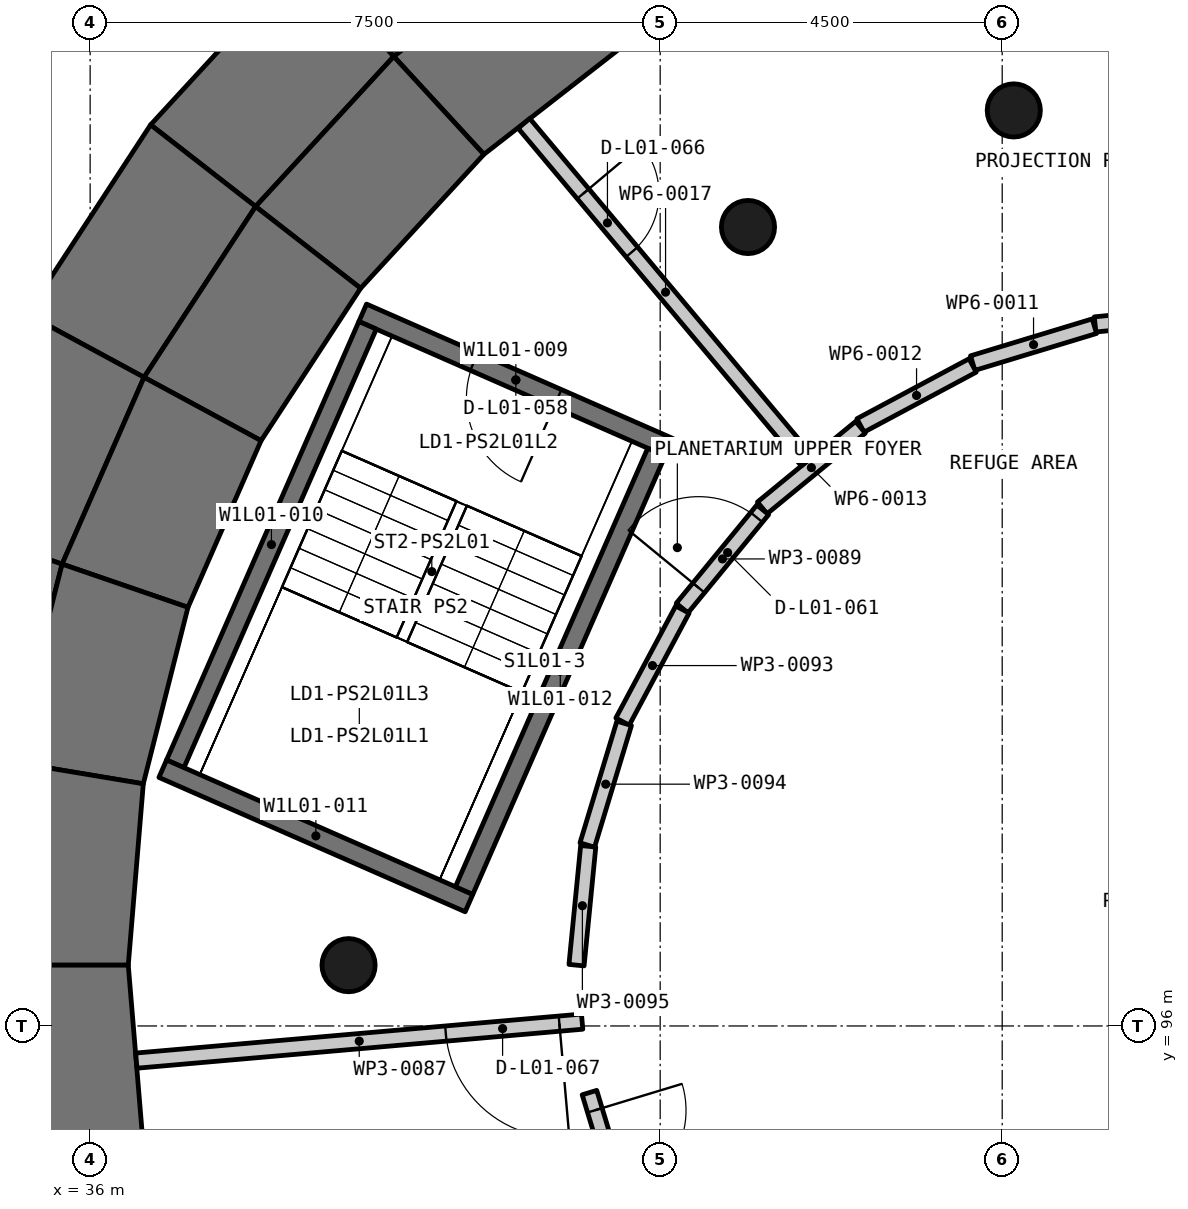
"""IFC4 building model, lengths in metres.
Left out: names, types, materials, properties, quantities, classifications, styles, units other than length and angle.
Written with IfcOpenShell. Run it as: python <this file> out.ifc"""

import sys

from ifc_helpers import new_model, si_unit, direction, frame, frame_2d, origin, origin_2d, place, context, subcontext, project, spatial, polyline, rectangle, circle, outline, extrude, element, fill, save


model = new_model("IFC4")
c1 = context("Model", 3, precision=1e-05, world=origin(), true_north=direction((0.0, 1.0)))
c2 = subcontext(c1, "Body", "Model", "MODEL_VIEW")
j1 = project(units=[si_unit("LENGTHUNIT", "METRE"), si_unit("PLANEANGLEUNIT", "RADIAN")], contexts=[c1])
p1 = place(None, origin())
s1 = spatial("IfcSite", under=j1, at=p1, CompositionType="ELEMENT")
p2 = place(p1, origin())
s2 = spatial("IfcBuilding", under=s1, at=p2, CompositionType="ELEMENT")
p3 = place(p2, frame((0.0, 0.0, 6.0)))
s3 = spatial("IfcBuildingStorey", under=s2, at=p3, CompositionType="ELEMENT", Elevation=6.0)
for number, where, z_axis, x_axis in (
    (1, (48.152, 108.045, -0.3), (0.0, 0.0, 1.0), (1.0, 0.0, 0.0)),
    (2, (44.656, 106.511, -0.3), (0.0, 0.0, 1.0), (1.0, 0.0, 0.0)),
    (3, (39.4, 96.8, -0.3), (0.0, 0.0, 1.0), (1.0, 0.0, 0.0)),
):
    element("IfcColumn", number, at=place(p3, frame(where, z_axis=z_axis, x_axis=x_axis)), inside=s3, PredefinedType="COLUMN", context=c2, shape_type="SweptSolid", body=[
        extrude(circle(Radius=0.35, at=origin_2d()), origin(), (0.0, 0.0, 1.0), 5.25),
    ])
p4 = place(p3, frame((41.691, 111.18, -0.3), z_axis=(0.0, 0.0, 1.0), x_axis=(-0.78913990845, -0.614213484785, 0.0)))
e4 = element("IfcWall", 4, at=p4, inside=s3, PredefinedType="SHEAR", context=c2, shape_type="SweptSolid", body=[
    extrude(outline(polyline([(0.0, -0.873), (2.973, -0.873), (2.828, 0.873), (0.144, 0.872), (0.0, -0.873)])), origin(), (0.0, 0.0, 1.0), 2.625),
])
p5 = place(p3, frame((39.451, 109.452, -0.3), z_axis=(0.0, 0.0, 1.0), x_axis=(-0.677266435816, -0.73573784388, 0.0)))
e5 = element("IfcWall", 5, at=p5, inside=s3, PredefinedType="SHEAR", context=c2, shape_type="SweptSolid", body=[
    extrude(outline(polyline([(0.0, -0.872), (2.973, -0.872), (2.828, 0.872), (0.145, 0.873), (0.0, -0.872)])), origin(), (0.0, 0.0, 1.0), 2.625),
])
p6 = place(p3, frame((37.526, 107.379, -0.3), z_axis=(0.0, 0.0, 1.0), x_axis=(-0.546943979507, -0.837169208273, 0.0)))
e6 = element("IfcWall", 6, at=p6, inside=s3, PredefinedType="SHEAR", context=c2, shape_type="SweptSolid", body=[
    extrude(outline(polyline([(0.0, -0.873), (2.973, -0.873), (2.828, 0.872), (0.145, 0.872), (0.0, -0.873)])), origin(), (0.0, 0.0, 1.0), 2.625),
])
p7 = place(p3, frame((35.969, 105.017, -0.3), z_axis=(0.0, 0.0, 1.0), x_axis=(-0.401744866956, -0.915751637659, 0.0)))
e7 = element("IfcWall", 7, at=p7, inside=s3, PredefinedType="SHEAR", context=c2, shape_type="SweptSolid", body=[
    extrude(outline(polyline([(0.0, -0.873), (2.973, -0.872), (2.828, 0.873), (0.145, 0.872), (0.0, -0.873)])), origin(), (0.0, 0.0, 1.0), 2.625),
])
p8 = place(p3, frame((34.821, 102.43, -0.3), z_axis=(0.0, 0.0, 1.0), x_axis=(-0.245471690726, -0.969403759562, 0.0)))
e8 = element("IfcWall", 8, at=p8, inside=s3, PredefinedType="SHEAR", context=c2, shape_type="SweptSolid", body=[
    extrude(outline(polyline([(0.0, -0.872), (2.973, -0.872), (2.828, 0.872), (0.145, 0.873), (0.0, -0.872)])), origin(), (0.0, 0.0, 1.0), 2.625),
])
p9 = place(p3, frame((42.648, 109.715, -0.3), z_axis=(0.0, 0.0, 1.0), x_axis=(-0.789141546579, -0.614211380115, 0.0)))
e9 = element("IfcWall", 9, at=p9, inside=s3, PredefinedType="SHEAR", context=c2, shape_type="SweptSolid", body=[
    extrude(outline(polyline([(0.0, -0.873), (2.684, -0.872), (2.539, 0.873), (0.145, 0.873), (0.0, -0.873)])), origin(), (0.0, 0.0, 1.0), 2.625),
])
p10 = place(p3, frame((40.637, 108.164, -0.3), z_axis=(0.0, 0.0, 1.0), x_axis=(-0.677255547469, -0.735747866747, 0.0)))
e10 = element("IfcWall", 10, at=p10, inside=s3, PredefinedType="SHEAR", context=c2, shape_type="SweptSolid", body=[
    extrude(outline(polyline([(0.0, -0.872), (2.684, -0.873), (2.539, 0.872), (0.145, 0.872), (0.0, -0.872)])), origin(), (0.0, 0.0, 1.0), 2.625),
])
p11 = place(p3, frame((38.907, 106.303, -0.3), z_axis=(0.0, 0.0, 1.0), x_axis=(-0.546950284291, -0.837165089163, 0.0)))
e11 = element("IfcWall", 11, at=p11, inside=s3, PredefinedType="SHEAR", context=c2, shape_type="SweptSolid", body=[
    extrude(outline(polyline([(0.0, -0.873), (2.684, -0.873), (2.539, 0.872), (0.145, 0.873), (0.0, -0.873)])), origin(), (0.0, 0.0, 1.0), 2.625),
])
p12 = place(p3, frame((37.508, 104.183, -0.3), z_axis=(0.0, 0.0, 1.0), x_axis=(-0.401711016893, -0.915766487106, 0.0)))
e12 = element("IfcWall", 12, at=p12, inside=s3, PredefinedType="SHEAR", context=c2, shape_type="SweptSolid", body=[
    extrude(outline(polyline([(0.0, -0.873), (2.684, -0.872), (2.539, 0.873), (0.145, 0.872), (0.0, -0.873)])), origin(), (0.0, 0.0, 1.0), 2.625),
])
p13 = place(p3, frame((36.477, 101.862, -0.3), z_axis=(0.0, 0.0, 1.0), x_axis=(-0.245531165049, -0.969388697577, 0.0)))
e13 = element("IfcWall", 13, at=p13, inside=s3, PredefinedType="SHEAR", context=c2, shape_type="SweptSolid", body=[
    extrude(outline(polyline([(-0.0, -0.873), (2.684, -0.873), (2.539, 0.873), (0.145, 0.873), (-0.0, -0.873)])), origin(), (0.0, 0.0, 1.0), 2.625),
])
p14 = place(p3, frame((35.842, 99.403, -0.3), z_axis=(0.0, 0.0, 1.0), x_axis=(-0.082601284234, -0.996582674866, 0.0)))
e14 = element("IfcWall", 14, at=p14, inside=s3, PredefinedType="SHEAR", context=c2, shape_type="SweptSolid", body=[
    extrude(outline(polyline([(0.0, -0.873), (2.684, -0.872), (2.539, 0.872), (0.145, 0.872), (0.0, -0.873)])), origin(), (0.0, 0.0, 1.0), 2.625),
])
p15 = place(p3, frame((35.62, 96.872, -0.3), z_axis=(0.0, 0.0, 1.0), x_axis=(0.082601284234, -0.996582674866, 0.0)))
e15 = element("IfcWall", 15, at=p15, inside=s3, PredefinedType="SHEAR", context=c2, shape_type="SweptSolid", body=[
    extrude(outline(polyline([(0.0, -0.872), (2.684, -0.873), (2.539, 0.872), (0.145, 0.872), (0.0, -0.872)])), origin(), (0.0, 0.0, 1.0), 2.625),
])
p16 = place(p3, frame((42.371, 110.226, 2.325), z_axis=(0.0, 0.0, 1.0), x_axis=(-0.789178347827, -0.614164094783, 0.0)))
e16 = element("IfcWall", 16, at=p16, inside=s3, PredefinedType="SHEAR", context=c2, shape_type="SweptSolid", body=[
    extrude(outline(polyline([(0.0, -1.446), (2.874, -1.446), (2.634, 1.446), (0.239, 1.446), (0.0, -1.446)])), origin(), (0.0, 0.0, 1.0), 2.625),
])
p17 = place(p3, frame((40.279, 108.622, 2.325), z_axis=(0.0, 0.0, 1.0), x_axis=(-0.677277359134, -0.735727788523, 0.0)))
e17 = element("IfcWall", 17, at=p17, inside=s3, PredefinedType="SHEAR", context=c2, shape_type="SweptSolid", body=[
    extrude(outline(polyline([(0.0, -1.446), (2.874, -1.446), (2.634, 1.446), (0.24, 1.446), (0.0, -1.446)])), origin(), (0.0, 0.0, 1.0), 2.625),
])
p18 = place(p3, frame((38.479, 106.697, 2.325), z_axis=(0.0, 0.0, 1.0), x_axis=(-0.546951759565, -0.837164125311, 0.0)))
e18 = element("IfcWall", 18, at=p18, inside=s3, PredefinedType="SHEAR", context=c2, shape_type="SweptSolid", body=[
    extrude(outline(polyline([(0.0, -1.446), (2.874, -1.446), (2.634, 1.446), (0.24, 1.446), (0.0, -1.446)])), origin(), (0.0, 0.0, 1.0), 2.625),
])
p19 = place(p3, frame((37.021, 104.501, 2.325), z_axis=(0.0, 0.0, 1.0), x_axis=(-0.40165649528, -0.915790401675, 0.0)))
e19 = element("IfcWall", 19, at=p19, inside=s3, PredefinedType="SHEAR", context=c2, shape_type="SweptSolid", body=[
    extrude(outline(polyline([(0.0, -1.446), (2.874, -1.446), (2.634, 1.446), (0.24, 1.446), (0.0, -1.446)])), origin(), (0.0, 0.0, 1.0), 2.625),
])
p20 = place(p3, frame((35.944, 102.095, 2.325), z_axis=(0.0, 0.0, 1.0), x_axis=(-0.245453198001, -0.969408442088, 0.0)))
e20 = element("IfcWall", 20, at=p20, inside=s3, PredefinedType="SHEAR", context=c2, shape_type="SweptSolid", body=[
    extrude(outline(polyline([(0.0, -1.446), (2.874, -1.446), (2.634, 1.446), (0.24, 1.446), (0.0, -1.446)])), origin(), (0.0, 0.0, 1.0), 2.625),
])
p21 = place(p3, frame((35.278, 99.544, 2.325), z_axis=(0.0, 0.0, 1.0), x_axis=(-0.08258141183, -0.996584321781, 0.0)))
e21 = element("IfcWall", 21, at=p21, inside=s3, PredefinedType="SHEAR", context=c2, shape_type="SweptSolid", body=[
    extrude(outline(polyline([(0.0, -1.446), (2.874, -1.446), (2.634, 1.446), (0.24, 1.446), (0.0, -1.446)])), origin(), (0.0, 0.0, 1.0), 2.625),
])
p22 = place(p3, frame((35.041, 96.919, 2.325), z_axis=(0.0, 0.0, 1.0), x_axis=(0.082574420244, -0.99658490111, 0.0)))
e22 = element("IfcWall", 22, at=p22, inside=s3, PredefinedType="SHEAR", context=c2, shape_type="SweptSolid", body=[
    extrude(outline(polyline([(0.0, -1.446), (2.874, -1.446), (2.634, 1.446), (0.24, 1.446), (0.0, -1.446)])), origin(), (0.0, 0.0, 1.0), 2.625),
])
p23 = place(p3, frame((43.616, 103.615, -0.3), z_axis=(0.0, 0.0, 1.0), x_axis=(-0.915768514631, 0.401706394785, 0.0)))
e23 = element("IfcWall", 23, at=p23, inside=s3, PredefinedType="SHEAR", context=c2, shape_type="SweptSolid", body=[
    extrude(rectangle(XDim=4.4, YDim=0.25, at=frame_2d((2.2, 0.0))), origin(), (0.0, 0.0, 1.0), 5.25),
])
p24 = place(p23, frame((1.6, 0.0, 0.3)))
e24 = element("IfcOpeningElement", 24, at=p24, cuts=e23, PredefinedType="OPENING", context=c2, shape_type="SweptSolid", body=[
    extrude(rectangle(XDim=1.2, YDim=2.2, at=frame_2d((0.6, 1.1))), frame((0.0, 0.135, 0.0), z_axis=(0.0, -1.0, 0.0), x_axis=(1.0, 0.0, 0.0)), (0.0, 0.0, 1.0), 0.27),
])
p25 = place(p3, frame((39.651, 105.218, -0.3), z_axis=(0.0, 0.0, 1.0), x_axis=(-0.401711100828, -0.915766450287, 0.0)))
e25 = element("IfcWall", 25, at=p25, inside=s3, PredefinedType="SHEAR", context=c2, shape_type="SweptSolid", body=[
    extrude(rectangle(XDim=6.3, YDim=0.25, at=frame_2d((3.15, 0.0))), origin(), (0.0, 0.0, 1.0), 5.25),
])
p26 = place(p3, frame((40.985, 97.617, -0.3), z_axis=(0.0, 0.0, 1.0), x_axis=(-0.915768514631, 0.401706394785, 0.0)))
e26 = element("IfcWall", 26, at=p26, inside=s3, PredefinedType="SHEAR", context=c2, shape_type="SweptSolid", body=[
    extrude(rectangle(XDim=4.4, YDim=0.25, at=frame_2d((2.2, 0.0))), origin(), (0.0, 0.0, 1.0), 5.25),
])
p27 = place(p3, frame((43.451, 103.551, -0.3), z_axis=(0.0, 0.0, 1.0), x_axis=(-0.401678600913, -0.915780706047, 0.0)))
e27 = element("IfcWall", 27, at=p27, inside=s3, PredefinedType="SHEAR", context=c2, shape_type="SweptSolid", body=[
    extrude(rectangle(XDim=6.3, YDim=0.25, at=frame_2d((3.15, 0.0))), origin(), (0.0, 0.0, 1.0), 5.25),
])
p28 = place(p3, frame((42.473, 96.057, 0.0), z_axis=(0.0, 0.0, 1.0), x_axis=(-0.99619799204, -0.087118084548, 0.0)))
e28 = element("IfcWall", 28, at=p28, inside=s3, PredefinedType="PARTITIONING", context=c2, shape_type="SweptSolid", body=[
    extrude(rectangle(XDim=5.888, YDim=0.2, at=frame_2d((2.944, 0.0))), origin(), (0.0, 0.0, 1.0), 4.15),
])
p29 = place(p28, frame((0.301, 0.0, 0.0)))
e29 = element("IfcOpeningElement", 29, at=p29, cuts=e28, PredefinedType="OPENING", context=c2, shape_type="SweptSolid", body=[
    extrude(rectangle(XDim=1.5, YDim=2.1, at=frame_2d((0.75, 1.05))), frame((0.0, 0.11, 0.0), z_axis=(0.0, -1.0, 0.0), x_axis=(1.0, 0.0, 0.0)), (0.0, 0.0, 1.0), 0.22),
])
p30 = place(p3, frame((49.222, 105.229, 0.0), z_axis=(0.0, 0.0, 1.0), x_axis=(0.995187275823, 0.097991254916, 0.0)))
e30 = element("IfcWall", 30, at=p30, inside=s3, PredefinedType="PARTITIONING", context=c2, shape_type="SweptSolid", body=[
    extrude(rectangle(XDim=1.886, YDim=0.2, at=frame_2d((0.943, 0.0))), origin(), (0.0, 0.0, 1.0), 4.95),
])
for number, where, z_axis, x_axis in (
    (31, (47.612, 104.721, 0.0), (0.0, 0.0, 1.0), (0.957, 0.29, 0.0)),
    (32, (46.135, 103.901, 0.0), (0.0, 0.0, 1.0), (0.882, 0.471, 0.0)),
):
    element("IfcWall", number, at=place(p3, frame(where, z_axis=z_axis, x_axis=x_axis)), inside=s3, PredefinedType="PARTITIONING", context=c2, shape_type="SweptSolid", body=[
        extrude(rectangle(XDim=1.673, YDim=0.2, at=frame_2d((0.836, 0.0))), origin(), (0.0, 0.0, 1.0), 4.95),
    ])
p31 = place(p3, frame((44.843, 102.816, 0.0), z_axis=(0.0, 0.0, 1.0), x_axis=(0.772941126344, 0.634477749969, 0.0)))
e33 = element("IfcWall", 33, at=p31, inside=s3, PredefinedType="PARTITIONING", context=c2, shape_type="SweptSolid", body=[
    extrude(rectangle(XDim=1.672, YDim=0.2, at=frame_2d((0.836, 0.0))), origin(), (0.0, 0.0, 1.0), 4.95),
])
p32 = place(p3, frame((43.789, 101.498, 0.0), z_axis=(0.0, 0.0, 1.0), x_axis=(0.634421768811, 0.772987075739, 0.0)))
e34 = element("IfcWall", 34, at=p32, inside=s3, PredefinedType="PARTITIONING", context=c2, shape_type="SweptSolid", body=[
    extrude(rectangle(XDim=1.672, YDim=0.2, at=frame_2d((0.836, 0.0))), origin(), (0.0, 0.0, 1.0), 4.95),
])
p33 = place(p32, frame((0.344, 0.0, 0.0)))
e35 = element("IfcOpeningElement", 35, at=p33, cuts=e34, PredefinedType="OPENING", context=c2, shape_type="SweptSolid", body=[
    extrude(rectangle(XDim=1.2, YDim=2.1, at=frame_2d((0.6, 1.05))), frame((0.0, 0.11, 0.0), z_axis=(0.0, -1.0, 0.0), x_axis=(1.0, 0.0, 0.0)), (0.0, 0.0, 1.0), 0.22),
])
p34 = place(p3, frame((43.005, 100.004, 0.0), z_axis=(0.0, 0.0, 1.0), x_axis=(0.471467367282, 0.881883507946, 0.0)))
e36 = element("IfcWall", 36, at=p34, inside=s3, PredefinedType="PARTITIONING", context=c2, shape_type="SweptSolid", body=[
    extrude(rectangle(XDim=1.672, YDim=0.2, at=frame_2d((0.836, 0.0))), origin(), (0.0, 0.0, 1.0), 4.95),
])
p35 = place(p3, frame((42.541, 98.381, 0.0), z_axis=(0.0, 0.0, 1.0), x_axis=(0.2902382352, 0.956954422545, 0.0)))
e37 = element("IfcWall", 37, at=p35, inside=s3, PredefinedType="PARTITIONING", context=c2, shape_type="SweptSolid", body=[
    extrude(rectangle(XDim=1.673, YDim=0.2, at=frame_2d((0.836, 0.0))), origin(), (0.0, 0.0, 1.0), 4.95),
])
p36 = place(p3, frame((42.399, 96.8, 0.0), z_axis=(0.0, 0.0, 1.0), x_axis=(0.098026998104, 0.995183755717, 0.0)))
e38 = element("IfcWall", 38, at=p36, inside=s3, PredefinedType="PARTITIONING", context=c2, shape_type="SweptSolid", body=[
    extrude(rectangle(XDim=1.572, YDim=0.2, at=frame_2d((0.786, 0.0))), origin(), (0.0, 0.0, 1.0), 4.95),
])
p37 = place(p3, frame((42.57, 95.124, 0.0), z_axis=(0.0, 0.0, 1.0), x_axis=(0.290356433396, -0.956918565807, 0.0)))
e39 = element("IfcWall", 39, at=p37, inside=s3, PredefinedType="PARTITIONING", context=c2, shape_type="SweptSolid", body=[
    extrude(rectangle(XDim=1.786, YDim=0.2, at=frame_2d((0.893, 0.0))), origin(), (0.0, 0.0, 1.0), 4.95),
])
p38 = place(p37, frame((0.244, 0.0, 0.0)))
e40 = element("IfcOpeningElement", 40, at=p38, cuts=e39, PredefinedType="OPENING", context=c2, shape_type="SweptSolid", body=[
    extrude(rectangle(XDim=1.2, YDim=2.1, at=frame_2d((0.6, 1.05))), frame((0.0, 0.11, 0.0), z_axis=(0.0, -1.0, 0.0), x_axis=(1.0, 0.0, 0.0)), (0.0, 0.0, 1.0), 0.22),
])
p39 = place(p3, frame((41.708, 107.875, 0.0), z_axis=(0.0, 0.0, 1.0), x_axis=(0.642761379623, -0.76606645199, 0.0)))
e41 = element("IfcWall", 41, at=p39, inside=s3, PredefinedType="PARTITIONING", context=c2, shape_type="SweptSolid", body=[
    extrude(rectangle(XDim=5.797, YDim=0.2, at=frame_2d((2.899, 0.0))), origin(), (0.0, 0.0, 1.0), 4.15),
])
p40 = place(p39, frame((1.209, 0.0, 0.0)))
e42 = element("IfcOpeningElement", 42, at=p40, cuts=e41, PredefinedType="OPENING", context=c2, shape_type="SweptSolid", body=[
    extrude(rectangle(XDim=1.0, YDim=2.1, at=frame_2d((0.5, 1.05))), frame((0.0, 0.11, 0.0), z_axis=(0.0, -1.0, 0.0), x_axis=(1.0, 0.0, 0.0)), (0.0, 0.0, 1.0), 0.22),
])
p41 = place(p24, origin())
e43 = element("IfcDoor", 43, at=p41, inside=s3, OperationType="SINGLE_SWING_LEFT", PredefinedType="DOOR", context=c2, shape_type="SweptSolid", body=[
    extrude(rectangle(XDim=1.2, YDim=2.2, at=frame_2d((0.6, 1.1))), frame((0.0, 0.025, 0.0), z_axis=(0.0, -1.0, 0.0), x_axis=(1.0, 0.0, 0.0)), (0.0, 0.0, 1.0), 0.05),
])
fill(e24, e43)
p42 = place(p38, origin())
e44 = element("IfcDoor", 44, at=p42, inside=s3, OperationType="SINGLE_SWING_RIGHT", PredefinedType="DOOR", context=c2, shape_type="SweptSolid", body=[
    extrude(rectangle(XDim=1.2, YDim=2.1, at=frame_2d((0.6, 1.05))), frame((0.0, 0.025, 0.0), z_axis=(0.0, -1.0, 0.0), x_axis=(1.0, 0.0, 0.0)), (0.0, 0.0, 1.0), 0.05),
])
fill(e40, e44)
p43 = place(p33, origin())
e45 = element("IfcDoor", 45, at=p43, inside=s3, OperationType="SINGLE_SWING_LEFT", PredefinedType="DOOR", context=c2, shape_type="SweptSolid", body=[
    extrude(rectangle(XDim=1.2, YDim=2.1, at=frame_2d((0.6, 1.05))), frame((0.0, 0.025, 0.0), z_axis=(0.0, -1.0, 0.0), x_axis=(1.0, 0.0, 0.0)), (0.0, 0.0, 1.0), 0.05),
])
fill(e35, e45)
p44 = place(p40, origin())
e46 = element("IfcDoor", 46, at=p44, inside=s3, OperationType="SINGLE_SWING_RIGHT", PredefinedType="DOOR", context=c2, shape_type="SweptSolid", body=[
    extrude(rectangle(XDim=1.0, YDim=2.1, at=frame_2d((0.5, 1.05))), frame((0.0, 0.025, 0.0), z_axis=(0.0, -1.0, 0.0), x_axis=(1.0, 0.0, 0.0)), (0.0, 0.0, 1.0), 0.05),
])
fill(e42, e46)
p45 = place(p29, origin())
e47 = element("IfcDoor", 47, at=p45, inside=s3, OperationType="DOUBLE_DOOR_SINGLE_SWING", PredefinedType="DOOR", context=c2, shape_type="SweptSolid", body=[
    extrude(rectangle(XDim=1.5, YDim=2.1, at=frame_2d((0.75, 1.05))), frame((0.0, 0.025, 0.0), z_axis=(0.0, -1.0, 0.0), x_axis=(1.0, 0.0, 0.0)), (0.0, 0.0, 1.0), 0.05),
])
fill(e29, e47)
save(model, sys.argv[1])
